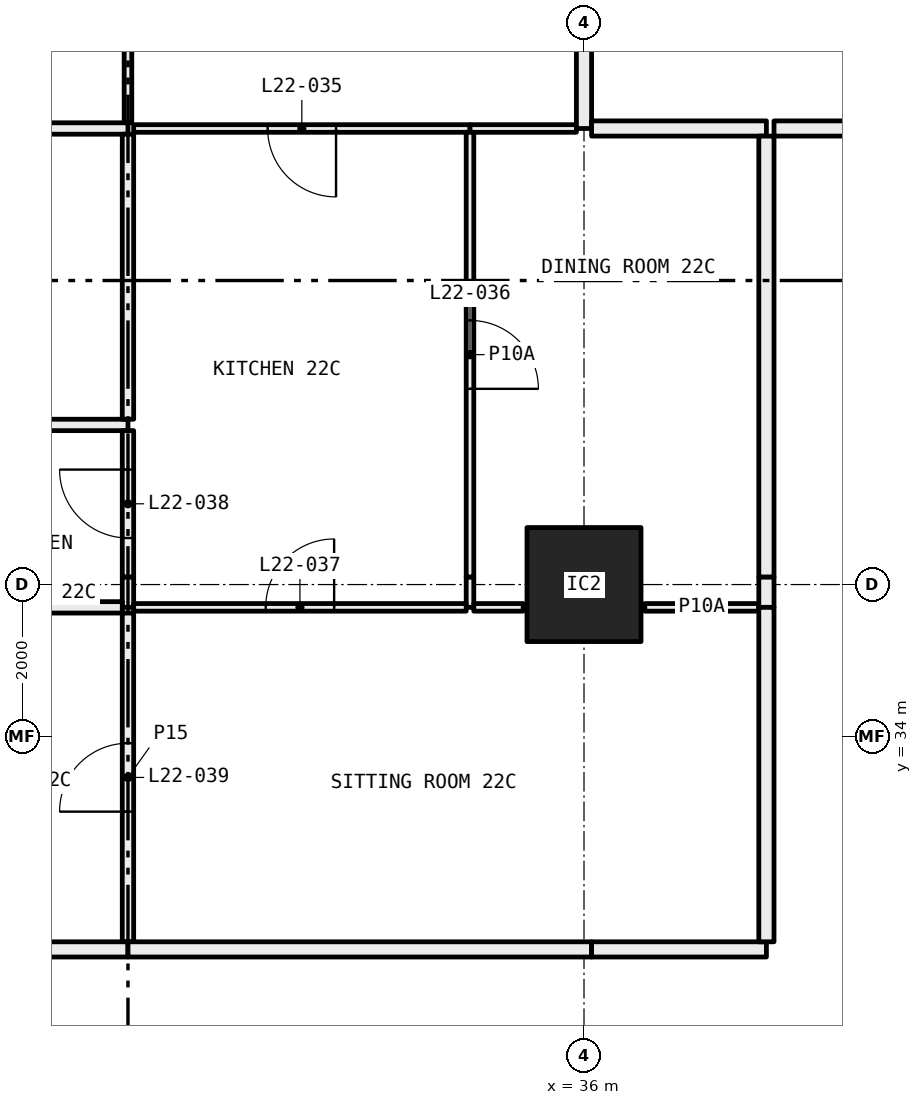
"""IFC4 building model, lengths in metres.
Left out: names, types, materials, properties, quantities, classifications, styles, units other than length and angle.
Written with IfcOpenShell. Run it as: python <this file> out.ifc"""

import sys

from ifc_helpers import new_model, si_unit, direction, frame, frame_2d, origin, origin_2d, place, context, subcontext, project, spatial, rectangle, hollow_rectangle, extrude, element, fill, save


model = new_model("IFC4")
c1 = context("Model", 3, precision=1e-05, world=origin(), true_north=direction((0.0, 1.0)))
c2 = subcontext(c1, "Body", "Model", "MODEL_VIEW")
j1 = project(units=[si_unit("LENGTHUNIT", "METRE"), si_unit("PLANEANGLEUNIT", "RADIAN")], contexts=[c1])
p1 = place(None, origin())
s1 = spatial("IfcSite", under=j1, at=p1, CompositionType="ELEMENT")
p2 = place(p1, origin())
s2 = spatial("IfcBuilding", under=s1, at=p2, CompositionType="ELEMENT")
p3 = place(p2, frame((0.0, 0.0, 88.65)))
s3 = spatial("IfcBuildingStorey", under=s2, at=p3, CompositionType="ELEMENT", Elevation=88.65)
p4 = place(p3, frame((36.0, 36.0, 0.0), z_axis=(0.0, 0.0, 1.0), x_axis=(1.0, 0.0, 0.0)))
e1 = element("IfcColumn", 1, at=p4, inside=s3, PredefinedType="COLUMN", context=c2, shape_type="SweptSolid", body=[
    extrude(hollow_rectangle(XDim=1.5, YDim=1.5, WallThickness=0.065, at=origin_2d()), origin(), (0.0, 0.0, 1.0), 3.05),
])
p5 = place(p3, frame((30.0, 42.075, 0.0), z_axis=(0.0, 0.0, 1.0), x_axis=(0.0, 1.0, 0.0)))
e2 = element("IfcWall", 2, at=p5, inside=s3, PredefinedType="PARTITIONING", context=c2, shape_type="SweptSolid", body=[
    extrude(rectangle(XDim=5.205, YDim=0.1, at=frame_2d((2.603, 0.0))), origin(), (0.0, 0.0, 1.0), 3.05),
])
p6 = place(p5, frame((2.153, 0.0, 0.0)))
e3 = element("IfcOpeningElement", 3, at=p6, cuts=e2, PredefinedType="OPENING", context=c2, shape_type="SweptSolid", body=[
    extrude(rectangle(XDim=0.9, YDim=2.1, at=frame_2d((0.45, 1.05))), frame((0.0, 0.06, 0.0), z_axis=(0.0, -1.0, 0.0), x_axis=(1.0, 0.0, 0.0)), (0.0, 0.0, 1.0), 0.12),
])
p7 = place(p3, frame((26.0, 42.0, 0.0), z_axis=(0.0, 0.0, 1.0), x_axis=(1.0, 0.0, 0.0)))
e4 = element("IfcWall", 4, at=p7, inside=s3, PredefinedType="PARTITIONING", context=c2, shape_type="SweptSolid", body=[
    extrude(rectangle(XDim=4.0, YDim=0.15, at=frame_2d((2.0, 0.0))), origin(), (0.0, 0.0, 1.0), 3.05),
])
p8 = place(p7, frame((1.55, 0.0, 0.0)))
e5 = element("IfcOpeningElement", 5, at=p8, cuts=e4, PredefinedType="OPENING", context=c2, shape_type="SweptSolid", body=[
    extrude(rectangle(XDim=0.9, YDim=2.1, at=frame_2d((0.45, 1.05))), frame((0.0, 0.085, 0.0), z_axis=(0.0, -1.0, 0.0), x_axis=(1.0, 0.0, 0.0)), (0.0, 0.0, 1.0), 0.17),
])
p9 = place(p3, frame((30.075, 42.0, 0.0), z_axis=(0.0, 0.0, 1.0), x_axis=(1.0, 0.0, 0.0)))
e6 = element("IfcWall", 6, at=p9, inside=s3, PredefinedType="PARTITIONING", context=c2, shape_type="SweptSolid", body=[
    extrude(rectangle(XDim=4.425, YDim=0.1, at=frame_2d((2.212, 0.0))), origin(), (0.0, 0.0, 1.0), 3.05),
])
p10 = place(p9, frame((1.762, 0.0, 0.0)))
e7 = element("IfcOpeningElement", 7, at=p10, cuts=e6, PredefinedType="OPENING", context=c2, shape_type="SweptSolid", body=[
    extrude(rectangle(XDim=0.9, YDim=2.1, at=frame_2d((0.45, 1.05))), frame((0.0, 0.06, 0.0), z_axis=(0.0, -1.0, 0.0), x_axis=(1.0, 0.0, 0.0)), (0.0, 0.0, 1.0), 0.12),
])
p11 = place(p3, frame((34.5, 42.0, 0.0), z_axis=(0.0, 0.0, 1.0), x_axis=(1.0, 0.0, 0.0)))
e8 = element("IfcWall", 8, at=p11, inside=s3, PredefinedType="PARTITIONING", context=c2, shape_type="SweptSolid", body=[
    extrude(rectangle(XDim=1.4, YDim=0.1, at=frame_2d((0.7, 0.0))), origin(), (0.0, 0.0, 1.0), 3.05),
])
p12 = place(p3, frame((36.0, 42.0, 0.0), z_axis=(0.0, 0.0, 1.0), x_axis=(0.0, 1.0, 0.0)))
e9 = element("IfcWall", 9, at=p12, inside=s3, PredefinedType="PARTITIONING", context=c2, shape_type="SweptSolid", body=[
    extrude(rectangle(XDim=3.0, YDim=0.2, at=frame_2d((1.5, 0.0))), origin(), (0.0, 0.0, 1.0), 2.45),
])
p13 = place(p3, frame((30.0, 38.1, 0.0), z_axis=(0.0, 0.0, 1.0), x_axis=(-1.0, 0.0, 0.0)))
e10 = element("IfcWall", 10, at=p13, inside=s3, PredefinedType="PARTITIONING", context=c2, shape_type="SweptSolid", body=[
    extrude(rectangle(XDim=1.775, YDim=0.15, at=frame_2d((0.887, 0.0))), origin(), (0.0, 0.0, 1.0), 3.05),
])
p14 = place(p3, frame((30.0, 35.7, 0.0), z_axis=(0.0, 0.0, 1.0), x_axis=(0.0, 1.0, 0.0)))
e11 = element("IfcWall", 11, at=p14, inside=s3, PredefinedType="PARTITIONING", context=c2, shape_type="SweptSolid", body=[
    extrude(rectangle(XDim=0.4, YDim=0.15, at=frame_2d((0.2, 0.0))), origin(), (0.0, 0.0, 1.0), 2.45),
])
p15 = place(p3, frame((30.0, 36.1, 0.0), z_axis=(0.0, 0.0, 1.0), x_axis=(0.0, 1.0, 0.0)))
e12 = element("IfcWall", 12, at=p15, inside=s3, PredefinedType="PARTITIONING", context=c2, shape_type="SweptSolid", body=[
    extrude(rectangle(XDim=1.925, YDim=0.15, at=frame_2d((0.962, 0.0))), origin(), (0.0, 0.0, 1.0), 3.05),
])
p16 = place(p15, frame((0.512, 0.0, 0.0)))
e13 = element("IfcOpeningElement", 13, at=p16, cuts=e12, PredefinedType="OPENING", context=c2, shape_type="SweptSolid", body=[
    extrude(rectangle(XDim=0.9, YDim=2.1, at=frame_2d((0.45, 1.05))), frame((0.0, 0.085, 0.0), z_axis=(0.0, -1.0, 0.0), x_axis=(1.0, 0.0, 0.0)), (0.0, 0.0, 1.0), 0.17),
])
p17 = place(p3, frame((28.225, 35.7, 0.0), z_axis=(0.0, 0.0, 1.0), x_axis=(1.0, 0.0, 0.0)))
e14 = element("IfcWall", 14, at=p17, inside=s3, PredefinedType="PARTITIONING", context=c2, shape_type="SweptSolid", body=[
    extrude(rectangle(XDim=1.7, YDim=0.15, at=frame_2d((0.85, 0.0))), origin(), (0.0, 0.0, 1.0), 3.05),
])
p18 = place(p3, frame((30.0, 38.175, 0.0), z_axis=(0.0, 0.0, 1.0), x_axis=(0.0, 1.0, 0.0)))
e15 = element("IfcWall", 15, at=p18, inside=s3, PredefinedType="PARTITIONING", context=c2, shape_type="SweptSolid", body=[
    extrude(rectangle(XDim=3.75, YDim=0.15, at=frame_2d((1.875, 0.0))), origin(), (0.0, 0.0, 1.0), 3.05),
])
p19 = place(p3, frame((34.5, 35.7, 0.0), z_axis=(0.0, 0.0, 1.0), x_axis=(0.0, 1.0, 0.0)))
e16 = element("IfcWall", 16, at=p19, inside=s3, PredefinedType="PARTITIONING", context=c2, shape_type="SweptSolid", body=[
    extrude(rectangle(XDim=0.4, YDim=0.1, at=frame_2d((0.2, 0.0))), origin(), (0.0, 0.0, 1.0), 2.45),
])
p20 = place(p3, frame((34.5, 36.1, 0.0), z_axis=(0.0, 0.0, 1.0), x_axis=(0.0, 1.0, 0.0)))
e17 = element("IfcWall", 17, at=p20, inside=s3, PredefinedType="PARTITIONING", context=c2, shape_type="SweptSolid", body=[
    extrude(rectangle(XDim=5.85, YDim=0.1, at=frame_2d((2.925, 0.0))), origin(), (0.0, 0.0, 1.0), 3.05),
])
p21 = place(p20, frame((2.475, 0.0, 0.0)))
e18 = element("IfcOpeningElement", 18, at=p21, cuts=e17, PredefinedType="OPENING", context=c2, shape_type="SweptSolid", body=[
    extrude(rectangle(XDim=0.9, YDim=2.1, at=frame_2d((0.45, 1.05))), frame((0.0, 0.06, 0.0), z_axis=(0.0, -1.0, 0.0), x_axis=(1.0, 0.0, 0.0)), (0.0, 0.0, 1.0), 0.12),
])
p22 = place(p3, frame((30.075, 35.7, 0.0), z_axis=(0.0, 0.0, 1.0), x_axis=(1.0, 0.0, 0.0)))
e19 = element("IfcWall", 19, at=p22, inside=s3, PredefinedType="PARTITIONING", context=c2, shape_type="SweptSolid", body=[
    extrude(rectangle(XDim=4.375, YDim=0.1, at=frame_2d((2.188, 0.0))), origin(), (0.0, 0.0, 1.0), 3.05),
])
p23 = place(p22, frame((1.738, 0.0, 0.0)))
e20 = element("IfcOpeningElement", 20, at=p23, cuts=e19, PredefinedType="OPENING", context=c2, shape_type="SweptSolid", body=[
    extrude(rectangle(XDim=0.9, YDim=2.1, at=frame_2d((0.45, 1.05))), frame((0.0, 0.06, 0.0), z_axis=(0.0, -1.0, 0.0), x_axis=(1.0, 0.0, 0.0)), (0.0, 0.0, 1.0), 0.12),
])
p24 = place(p3, frame((34.55, 35.7, 0.0), z_axis=(0.0, 0.0, 1.0), x_axis=(1.0, 0.0, 0.0)))
e21 = element("IfcWall", 21, at=p24, inside=s3, PredefinedType="PARTITIONING", context=c2, shape_type="SweptSolid", body=[
    extrude(rectangle(XDim=0.65, YDim=0.1, at=frame_2d((0.325, 0.0))), origin(), (0.0, 0.0, 1.0), 3.05),
])
p25 = place(p3, frame((36.8, 35.7, 0.0), z_axis=(0.0, 0.0, 1.0), x_axis=(1.0, 0.0, 0.0)))
e22 = element("IfcWall", 22, at=p25, inside=s3, PredefinedType="PARTITIONING", context=c2, shape_type="SweptSolid", body=[
    extrude(rectangle(XDim=1.5, YDim=0.1, at=frame_2d((0.75, 0.0))), origin(), (0.0, 0.0, 1.0), 3.05),
])
p26 = place(p3, frame((38.4, 42.0, 0.0), z_axis=(0.0, 0.0, 1.0), x_axis=(-1.0, 0.0, 0.0)))
e23 = element("IfcWall", 23, at=p26, inside=s3, PredefinedType="PARTITIONING", context=c2, shape_type="SweptSolid", body=[
    extrude(rectangle(XDim=2.3, YDim=0.2, at=frame_2d((1.15, 0.0))), origin(), (0.0, 0.0, 1.0), 3.05),
])
p27 = place(p3, frame((38.4, 35.7, 0.0), z_axis=(0.0, 0.0, 1.0), x_axis=(0.0, 1.0, 0.0)))
e24 = element("IfcWall", 24, at=p27, inside=s3, PredefinedType="PARTITIONING", context=c2, shape_type="SweptSolid", body=[
    extrude(rectangle(XDim=0.4, YDim=0.2, at=frame_2d((0.2, 0.0))), origin(), (0.0, 0.0, 1.0), 2.45),
])
p28 = place(p3, frame((38.4, 36.1, 0.0), z_axis=(0.0, 0.0, 1.0), x_axis=(0.0, 1.0, 0.0)))
e25 = element("IfcWall", 25, at=p28, inside=s3, PredefinedType="PARTITIONING", context=c2, shape_type="SweptSolid", body=[
    extrude(rectangle(XDim=5.8, YDim=0.2, at=frame_2d((2.9, 0.0))), origin(), (0.0, 0.0, 1.0), 3.05),
])
p29 = place(p3, frame((30.0, 31.3, 0.0), z_axis=(0.0, 0.0, 1.0), x_axis=(0.0, 1.0, 0.0)))
e26 = element("IfcWall", 26, at=p29, inside=s3, PredefinedType="PARTITIONING", context=c2, shape_type="SweptSolid", body=[
    extrude(rectangle(XDim=4.325, YDim=0.15, at=frame_2d((2.163, 0.0))), origin(), (0.0, 0.0, 1.0), 3.05),
])
p30 = place(p29, frame((1.712, 0.0, 0.0)))
e27 = element("IfcOpeningElement", 27, at=p30, cuts=e26, PredefinedType="OPENING", context=c2, shape_type="SweptSolid", body=[
    extrude(rectangle(XDim=0.9, YDim=2.1, at=frame_2d((0.45, 1.05))), frame((0.0, 0.085, 0.0), z_axis=(0.0, -1.0, 0.0), x_axis=(1.0, 0.0, 0.0)), (0.0, 0.0, 1.0), 0.17),
])
p31 = place(p3, frame((26.0, 31.2, 0.0), z_axis=(0.0, 0.0, 1.0), x_axis=(1.0, 0.0, 0.0)))
e28 = element("IfcWall", 28, at=p31, inside=s3, PredefinedType="PARTITIONING", context=c2, shape_type="SweptSolid", body=[
    extrude(rectangle(XDim=4.0, YDim=0.2, at=frame_2d((2.0, 0.0))), origin(), (0.0, 0.0, 1.0), 3.05),
])
p32 = place(p3, frame((30.0, 31.2, 0.0), z_axis=(0.0, 0.0, 1.0), x_axis=(1.0, 0.0, 0.0)))
e29 = element("IfcWall", 29, at=p32, inside=s3, PredefinedType="PARTITIONING", context=c2, shape_type="SweptSolid", body=[
    extrude(rectangle(XDim=6.1, YDim=0.2, at=frame_2d((3.05, 0.0))), origin(), (0.0, 0.0, 1.0), 2.45),
])
p33 = place(p3, frame((36.1, 31.2, 0.0), z_axis=(0.0, 0.0, 1.0), x_axis=(1.0, 0.0, 0.0)))
e30 = element("IfcWall", 30, at=p33, inside=s3, PredefinedType="PARTITIONING", context=c2, shape_type="SweptSolid", body=[
    extrude(rectangle(XDim=2.3, YDim=0.2, at=frame_2d((1.15, 0.0))), origin(), (0.0, 0.0, 1.0), 3.05),
])
p34 = place(p3, frame((38.4, 31.3, 0.0), z_axis=(0.0, 0.0, 1.0), x_axis=(0.0, 1.0, 0.0)))
e31 = element("IfcWall", 31, at=p34, inside=s3, PredefinedType="PARTITIONING", context=c2, shape_type="SweptSolid", body=[
    extrude(rectangle(XDim=4.4, YDim=0.2, at=frame_2d((2.2, 0.0))), origin(), (0.0, 0.0, 1.0), 3.05),
])
p35 = place(p3, frame((38.5, 42.0, 0.0), z_axis=(0.0, 0.0, 1.0), x_axis=(1.0, 0.0, 0.0)))
e32 = element("IfcWall", 32, at=p35, inside=s3, PredefinedType="PARTITIONING", context=c2, shape_type="SweptSolid", body=[
    extrude(rectangle(XDim=2.3, YDim=0.2, at=frame_2d((1.15, 0.0))), origin(), (0.0, 0.0, 1.0), 3.05),
])
p36 = place(p10, frame((0.9, 0.0, 0.0), x_axis=(-1.0, 0.0, 0.0)))
e33 = element("IfcDoor", 33, at=p36, inside=s3, OperationType="SINGLE_SWING_RIGHT", PredefinedType="DOOR", context=c2, shape_type="SweptSolid", body=[
    extrude(rectangle(XDim=0.9, YDim=2.1, at=frame_2d((0.45, 1.05))), frame((0.0, 0.025, 0.0), z_axis=(0.0, -1.0, 0.0), x_axis=(1.0, 0.0, 0.0)), (0.0, 0.0, 1.0), 0.05),
])
fill(e7, e33)
p37 = place(p21, frame((0.9, 0.0, 0.0), x_axis=(-1.0, 0.0, 0.0)))
e34 = element("IfcDoor", 34, at=p37, inside=s3, OperationType="SINGLE_SWING_LEFT", PredefinedType="DOOR", context=c2, shape_type="SweptSolid", body=[
    extrude(rectangle(XDim=0.9, YDim=2.1, at=frame_2d((0.45, 1.05))), frame((0.0, 0.025, 0.0), z_axis=(0.0, -1.0, 0.0), x_axis=(1.0, 0.0, 0.0)), (0.0, 0.0, 1.0), 0.05),
])
fill(e18, e34)
p38 = place(p23, origin())
e35 = element("IfcDoor", 35, at=p38, inside=s3, OperationType="SINGLE_SWING_LEFT", PredefinedType="DOOR", context=c2, shape_type="SweptSolid", body=[
    extrude(rectangle(XDim=0.9, YDim=2.1, at=frame_2d((0.45, 1.05))), frame((0.0, 0.025, 0.0), z_axis=(0.0, -1.0, 0.0), x_axis=(1.0, 0.0, 0.0)), (0.0, 0.0, 1.0), 0.05),
])
fill(e20, e35)
p39 = place(p16, origin())
e36 = element("IfcDoor", 36, at=p39, inside=s3, OperationType="SINGLE_SWING_LEFT", PredefinedType="DOOR", context=c2, shape_type="SweptSolid", body=[
    extrude(rectangle(XDim=0.9, YDim=2.1, at=frame_2d((0.45, 1.05))), frame((0.0, 0.025, 0.0), z_axis=(0.0, -1.0, 0.0), x_axis=(1.0, 0.0, 0.0)), (0.0, 0.0, 1.0), 0.05),
])
fill(e13, e36)
p40 = place(p30, origin())
e37 = element("IfcDoor", 37, at=p40, inside=s3, OperationType="SINGLE_SWING_RIGHT", PredefinedType="DOOR", context=c2, shape_type="SweptSolid", body=[
    extrude(rectangle(XDim=0.9, YDim=2.1, at=frame_2d((0.45, 1.05))), frame((0.0, 0.025, 0.0), z_axis=(0.0, -1.0, 0.0), x_axis=(1.0, 0.0, 0.0)), (0.0, 0.0, 1.0), 0.05),
])
fill(e27, e37)
save(model, sys.argv[1])
